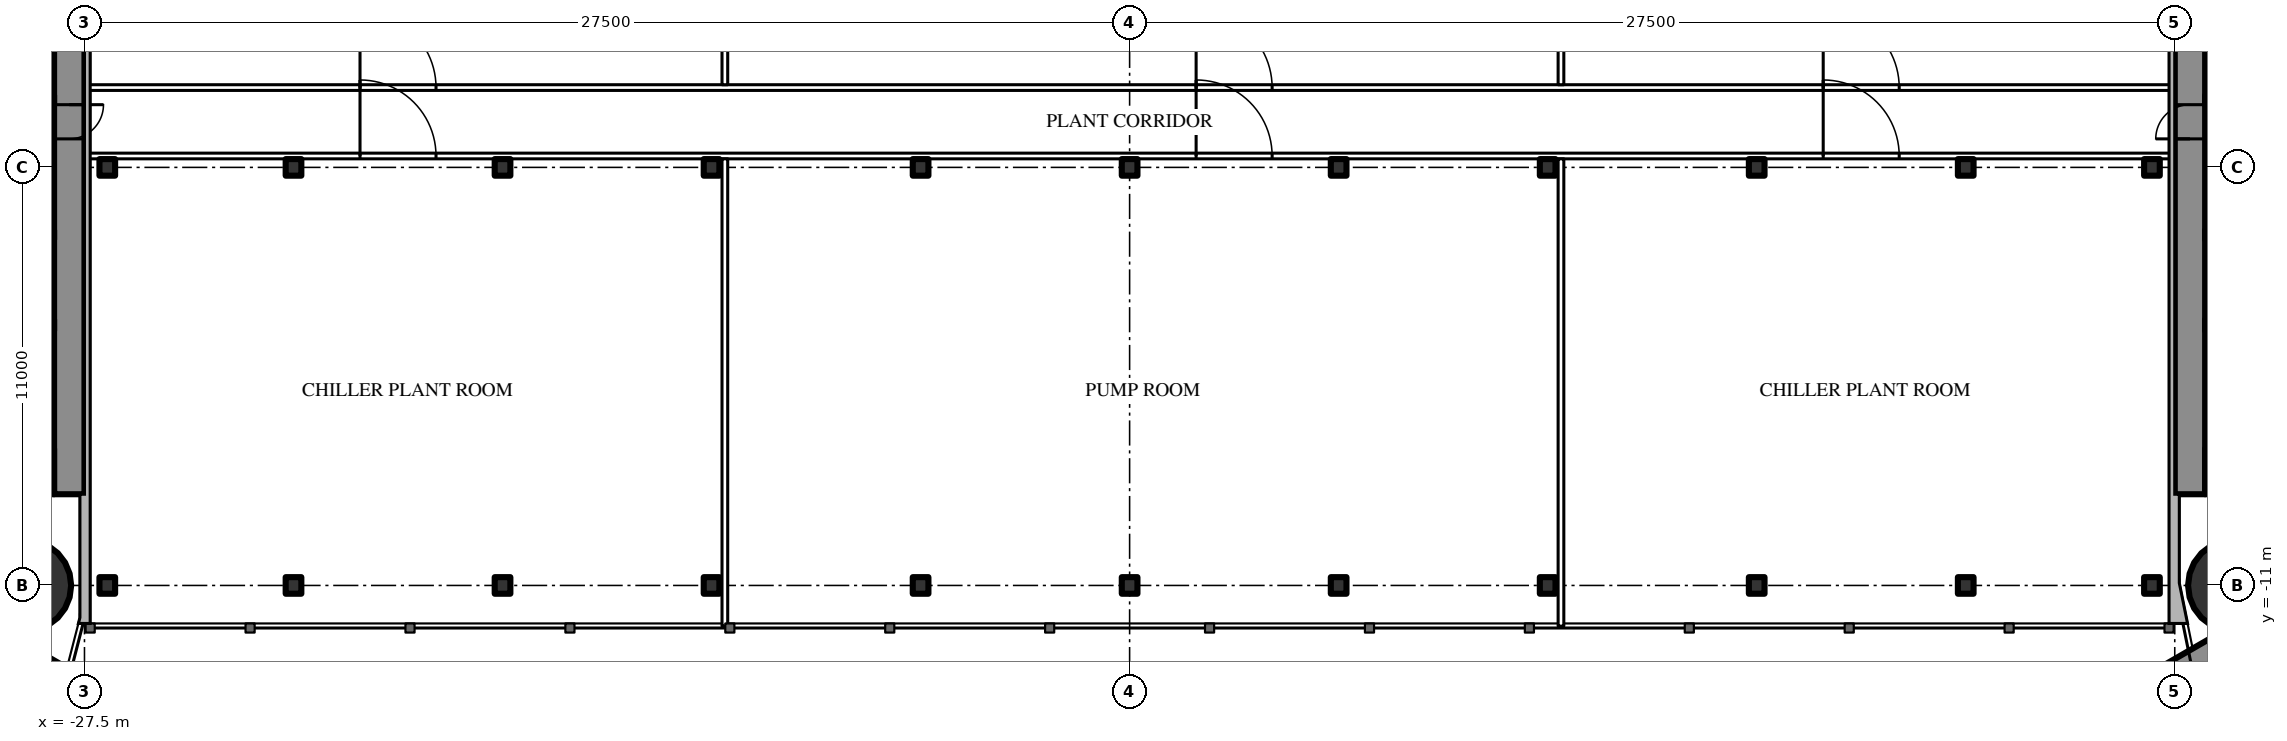
"""IFC4 building model, lengths in metres.
Left out: names, types, materials, properties, quantities, classifications, styles, units other than length and angle.
Written with IfcOpenShell. Run it as: python <this file> out.ifc"""

import sys

from ifc_helpers import new_model, si_unit, direction, frame, frame_2d, origin, origin_2d, place, context, subcontext, project, spatial, rectangle, circle, i_section, extrude, element, fill, save


model = new_model("IFC4")
c1 = context("Model", 3, precision=1e-05, world=origin(), true_north=direction((0.0, 1.0)))
c2 = subcontext(c1, "Body", "Model", "MODEL_VIEW")
j1 = project(units=[si_unit("LENGTHUNIT", "METRE"), si_unit("PLANEANGLEUNIT", "RADIAN")], contexts=[c1])
p1 = place(None, origin())
s1 = spatial("IfcSite", under=j1, at=p1, CompositionType="ELEMENT")
p2 = place(p1, origin())
s2 = spatial("IfcBuilding", under=s1, at=p2, CompositionType="ELEMENT")
p3 = place(p2, frame((0.0, 0.0, 263.3)))
s3 = spatial("IfcBuildingStorey", under=s2, at=p3, CompositionType="ELEMENT", Elevation=263.3)
p4 = place(p3, frame((-29.05, -11.0, 0.0), z_axis=(0.0, 0.0, 1.0), x_axis=(1.0, 0.0, 0.0)))
e1 = element("IfcColumn", 1, at=p4, inside=s3, PredefinedType="COLUMN", context=c2, shape_type="SweptSolid", body=[
    extrude(circle(Radius=1.2, at=origin_2d()), origin(), (0.0, 0.0, 1.0), 5.0),
])
p5 = place(p3, frame((-27.9, 8.6, 0.0), z_axis=(0.0, 0.0, 1.0), x_axis=(0.0, -1.0, 0.0)))
e2 = element("IfcWall", 2, at=p5, inside=s3, PredefinedType="SHEAR", context=c2, shape_type="SweptSolid", body=[
    extrude(rectangle(XDim=17.2, YDim=0.8, at=frame_2d((8.6, 0.0))), origin(), (0.0, 0.0, 1.0), 5.0),
])
p6 = place(p5, frame((6.95, 0.0, 0.0)))
e3 = element("IfcOpeningElement", 3, at=p6, cuts=e2, PredefinedType="OPENING", context=c2, shape_type="SweptSolid", body=[
    extrude(rectangle(XDim=0.9, YDim=2.2, at=frame_2d((0.45, 1.1))), frame((0.0, 0.41, 0.0), z_axis=(0.0, -1.0, 0.0), x_axis=(1.0, 0.0, 0.0)), (0.0, 0.0, 1.0), 0.82),
])
p7 = place(p3, frame((-28.3, -8.0, 0.0), z_axis=(0.0, 0.0, 1.0), x_axis=(-1.0, 0.0, 0.0)))
e4 = element("IfcWall", 4, at=p7, inside=s3, PredefinedType="SHEAR", context=c2, shape_type="SweptSolid", body=[
    extrude(rectangle(XDim=8.4, YDim=1.2, at=frame_2d((4.2, 0.0))), origin(), (0.0, 0.0, 1.0), 5.0),
])
p8 = place(p7, frame((0.25, 0.0, 0.0)))
e5 = element("IfcOpeningElement", 5, at=p8, cuts=e4, PredefinedType="OPENING", context=c2, shape_type="SweptSolid", body=[
    extrude(rectangle(XDim=1.0, YDim=2.2, at=frame_2d((0.5, 1.1))), frame((0.0, 0.61, 0.0), z_axis=(0.0, -1.0, 0.0), x_axis=(1.0, 0.0, 0.0)), (0.0, 0.0, 1.0), 1.22),
])
p9 = place(p3, frame((-28.3, -4.15, 0.0), z_axis=(0.0, 0.0, 1.0), x_axis=(-1.0, 0.0, 0.0)))
e6 = element("IfcWall", 6, at=p9, inside=s3, PredefinedType="SHEAR", context=c2, shape_type="SweptSolid", body=[
    extrude(rectangle(XDim=8.4, YDim=0.3, at=frame_2d((4.2, 0.0))), origin(), (0.0, 0.0, 1.0), 5.0),
])
for number, where, z_axis, x_axis in (
    (7, (-28.3, 1.775, 0.0), (0.0, 0.0, 1.0), (-1.0, 0.0, 0.0)),
    (8, (-28.3, -1.775, 0.0), (0.0, 0.0, 1.0), (-1.0, 0.0, 0.0)),
):
    element("IfcWall", number, at=place(p3, frame(where, z_axis=z_axis, x_axis=x_axis)), inside=s3, PredefinedType="SHEAR", context=c2, shape_type="SweptSolid", body=[
        extrude(rectangle(XDim=2.9, YDim=0.25, at=frame_2d((1.45, 0.0))), origin(), (0.0, 0.0, 1.0), 5.0),
    ])
p10 = place(p3, frame((-27.2, 14.3, 0.0), z_axis=(0.0, 0.0, 1.0), x_axis=(-0.866026593062, -0.499997940104, 0.0)))
e9 = element("IfcWall", 9, at=p10, inside=s3, PredefinedType="SHEAR", context=c2, shape_type="SweptSolid", body=[
    extrude(rectangle(XDim=28.946, YDim=1.2, at=frame_2d((14.473, 0.0))), origin(), (0.0, 0.0, 1.0), 5.0),
])
p11 = place(p10, frame((4.6, 0.0, 0.0)))
e10 = element("IfcOpeningElement", 10, at=p11, cuts=e9, PredefinedType="OPENING", context=c2, shape_type="SweptSolid", body=[
    extrude(rectangle(XDim=1.0, YDim=2.2, at=frame_2d((0.5, 1.1))), frame((0.0, 0.61, 0.0), z_axis=(0.0, -1.0, 0.0), x_axis=(1.0, 0.0, 0.0)), (0.0, 0.0, 1.0), 1.22),
])
p12 = place(p10, frame((13.395, 0.0, 0.0)))
e11 = element("IfcOpeningElement", 11, at=p12, cuts=e9, PredefinedType="OPENING", context=c2, shape_type="SweptSolid", body=[
    extrude(rectangle(XDim=1.8, YDim=2.2, at=frame_2d((0.9, 1.1))), frame((0.0, 0.61, 0.0), z_axis=(0.0, -1.0, 0.0), x_axis=(1.0, 0.0, 0.0)), (0.0, 0.0, 1.0), 1.22),
])
p13 = place(p3, frame((-27.2, -14.3, 0.0), z_axis=(0.0, 0.0, 1.0), x_axis=(-0.866024021859, 0.500002393557, 0.0)))
e12 = element("IfcWall", 12, at=p13, inside=s3, PredefinedType="SHEAR", context=c2, shape_type="SweptSolid", body=[
    extrude(rectangle(XDim=27.907, YDim=1.2, at=frame_2d((13.954, 0.0))), origin(), (0.0, 0.0, 1.0), 5.0),
])
p14 = place(p13, frame((4.6, 0.0, 0.0)))
e13 = element("IfcOpeningElement", 13, at=p14, cuts=e12, PredefinedType="OPENING", context=c2, shape_type="SweptSolid", body=[
    extrude(rectangle(XDim=1.0, YDim=2.2, at=frame_2d((0.5, 1.1))), frame((0.0, 0.61, 0.0), z_axis=(0.0, -1.0, 0.0), x_axis=(1.0, 0.0, 0.0)), (0.0, 0.0, 1.0), 1.22),
])
p15 = place(p13, frame((13.395, 0.0, 0.0)))
e14 = element("IfcOpeningElement", 14, at=p15, cuts=e12, PredefinedType="OPENING", context=c2, shape_type="SweptSolid", body=[
    extrude(rectangle(XDim=1.8, YDim=2.2, at=frame_2d((0.9, 1.1))), frame((0.0, 0.61, 0.0), z_axis=(0.0, -1.0, 0.0), x_axis=(1.0, 0.0, 0.0)), (0.0, 0.0, 1.0), 1.22),
])
p16 = place(p3, frame((29.05, -11.0, 0.0), z_axis=(0.0, 0.0, 1.0), x_axis=(1.0, 0.0, 0.0)))
e15 = element("IfcColumn", 15, at=p16, inside=s3, PredefinedType="COLUMN", context=c2, shape_type="SweptSolid", body=[
    extrude(circle(Radius=1.2, at=origin_2d()), origin(), (0.0, 0.0, 1.0), 5.0),
])
p17 = place(p3, frame((27.9, -8.6, 0.0), z_axis=(0.0, 0.0, 1.0), x_axis=(0.0, 1.0, 0.0)))
e16 = element("IfcWall", 16, at=p17, inside=s3, PredefinedType="SHEAR", context=c2, shape_type="SweptSolid", body=[
    extrude(rectangle(XDim=17.2, YDim=0.8, at=frame_2d((8.6, 0.0))), origin(), (0.0, 0.0, 1.0), 5.0),
])
p18 = place(p17, frame((9.35, 0.0, 0.0)))
e17 = element("IfcOpeningElement", 17, at=p18, cuts=e16, PredefinedType="OPENING", context=c2, shape_type="SweptSolid", body=[
    extrude(rectangle(XDim=0.9, YDim=2.2, at=frame_2d((0.45, 1.1))), frame((0.0, 0.41, 0.0), z_axis=(0.0, -1.0, 0.0), x_axis=(1.0, 0.0, 0.0)), (0.0, 0.0, 1.0), 0.82),
])
p19 = place(p3, frame((28.3, -8.0, 0.0), z_axis=(0.0, 0.0, 1.0), x_axis=(1.0, 0.0, 0.0)))
e18 = element("IfcWall", 18, at=p19, inside=s3, PredefinedType="SHEAR", context=c2, shape_type="SweptSolid", body=[
    extrude(rectangle(XDim=8.4, YDim=1.2, at=frame_2d((4.2, 0.0))), origin(), (0.0, 0.0, 1.0), 5.0),
])
p20 = place(p19, frame((0.25, 0.0, 0.0)))
e19 = element("IfcOpeningElement", 19, at=p20, cuts=e18, PredefinedType="OPENING", context=c2, shape_type="SweptSolid", body=[
    extrude(rectangle(XDim=1.0, YDim=2.2, at=frame_2d((0.5, 1.1))), frame((0.0, 0.61, 0.0), z_axis=(0.0, -1.0, 0.0), x_axis=(1.0, 0.0, 0.0)), (0.0, 0.0, 1.0), 1.22),
])
p21 = place(p3, frame((28.3, -4.15, 0.0), z_axis=(0.0, 0.0, 1.0), x_axis=(1.0, 0.0, 0.0)))
e20 = element("IfcWall", 20, at=p21, inside=s3, PredefinedType="SHEAR", context=c2, shape_type="SweptSolid", body=[
    extrude(rectangle(XDim=8.4, YDim=0.3, at=frame_2d((4.2, 0.0))), origin(), (0.0, 0.0, 1.0), 5.0),
])
for number, where, z_axis, x_axis in (
    (21, (28.3, -1.775, 0.0), (0.0, 0.0, 1.0), (1.0, 0.0, 0.0)),
    (22, (28.3, 1.775, 0.0), (0.0, 0.0, 1.0), (1.0, 0.0, 0.0)),
):
    element("IfcWall", number, at=place(p3, frame(where, z_axis=z_axis, x_axis=x_axis)), inside=s3, PredefinedType="SHEAR", context=c2, shape_type="SweptSolid", body=[
        extrude(rectangle(XDim=2.9, YDim=0.25, at=frame_2d((1.45, 0.0))), origin(), (0.0, 0.0, 1.0), 5.0),
    ])
p22 = place(p3, frame((27.2, -13.8, 0.0), z_axis=(0.0, 0.0, 1.0), x_axis=(0.866027159892, 0.499996958321, 0.0)))
e23 = element("IfcWall", 23, at=p22, inside=s3, PredefinedType="SHEAR", context=c2, shape_type="SweptSolid", body=[
    extrude(rectangle(XDim=27.947, YDim=1.2, at=frame_2d((13.973, 0.0))), origin(), (0.0, 0.0, 1.0), 5.0),
])
p23 = place(p22, frame((4.6, 0.0, 0.0)))
e24 = element("IfcOpeningElement", 24, at=p23, cuts=e23, PredefinedType="OPENING", context=c2, shape_type="SweptSolid", body=[
    extrude(rectangle(XDim=1.0, YDim=2.2, at=frame_2d((0.5, 1.1))), frame((0.0, 0.61, 0.0), z_axis=(0.0, -1.0, 0.0), x_axis=(1.0, 0.0, 0.0)), (0.0, 0.0, 1.0), 1.22),
])
p24 = place(p22, frame((13.395, 0.0, 0.0)))
e25 = element("IfcOpeningElement", 25, at=p24, cuts=e23, PredefinedType="OPENING", context=c2, shape_type="SweptSolid", body=[
    extrude(rectangle(XDim=1.8, YDim=2.2, at=frame_2d((0.9, 1.1))), frame((0.0, 0.61, 0.0), z_axis=(0.0, -1.0, 0.0), x_axis=(1.0, 0.0, 0.0)), (0.0, 0.0, 1.0), 1.22),
])
p25 = place(p3, frame((27.2, 13.8, 0.0), z_axis=(0.0, 0.0, 1.0), x_axis=(0.866024515034, -0.500001539357, 0.0)))
e26 = element("IfcWall", 26, at=p25, inside=s3, PredefinedType="SHEAR", context=c2, shape_type="SweptSolid", body=[
    extrude(rectangle(XDim=26.907, YDim=1.2, at=frame_2d((13.454, 0.0))), origin(), (0.0, 0.0, 1.0), 5.0),
])
p26 = place(p25, frame((4.6, 0.0, 0.0)))
e27 = element("IfcOpeningElement", 27, at=p26, cuts=e26, PredefinedType="OPENING", context=c2, shape_type="SweptSolid", body=[
    extrude(rectangle(XDim=1.0, YDim=2.2, at=frame_2d((0.5, 1.1))), frame((0.0, 0.61, 0.0), z_axis=(0.0, -1.0, 0.0), x_axis=(1.0, 0.0, 0.0)), (0.0, 0.0, 1.0), 1.22),
])
p27 = place(p25, frame((13.395, 0.0, 0.0)))
e28 = element("IfcOpeningElement", 28, at=p27, cuts=e26, PredefinedType="OPENING", context=c2, shape_type="SweptSolid", body=[
    extrude(rectangle(XDim=1.8, YDim=2.2, at=frame_2d((0.9, 1.1))), frame((0.0, 0.61, 0.0), z_axis=(0.0, -1.0, 0.0), x_axis=(1.0, 0.0, 0.0)), (0.0, 0.0, 1.0), 1.22),
])
for number, where, z_axis, x_axis in (
    (29, (-26.9, -11.0, 0.0), (0.0, 0.0, 1.0), (1.0, 0.0, 0.0)),
    (30, (-22.0, -11.0, 0.0), (0.0, 0.0, 1.0), (1.0, 0.0, 0.0)),
    (31, (-16.5, -11.0, 0.0), (0.0, 0.0, 1.0), (1.0, 0.0, 0.0)),
    (32, (-11.0, -11.0, 0.0), (0.0, 0.0, 1.0), (1.0, 0.0, 0.0)),
    (33, (-5.5, -11.0, 0.0), (0.0, 0.0, 1.0), (1.0, 0.0, 0.0)),
    (34, (0.0, -11.0, 0.0), (0.0, 0.0, 1.0), (1.0, 0.0, 0.0)),
    (35, (5.5, -11.0, 0.0), (0.0, 0.0, 1.0), (1.0, 0.0, 0.0)),
    (36, (11.0, -11.0, 0.0), (0.0, 0.0, 1.0), (1.0, 0.0, 0.0)),
    (37, (16.5, -11.0, 0.0), (0.0, 0.0, 1.0), (1.0, 0.0, 0.0)),
    (38, (22.0, -11.0, 0.0), (0.0, 0.0, 1.0), (1.0, 0.0, 0.0)),
    (39, (26.9, -11.0, 0.0), (0.0, 0.0, 1.0), (1.0, 0.0, 0.0)),
    (40, (-26.9, 0.0, 0.0), (0.0, 0.0, 1.0), (1.0, 0.0, 0.0)),
    (41, (-22.0, 0.0, 0.0), (0.0, 0.0, 1.0), (1.0, 0.0, 0.0)),
    (42, (-16.5, 0.0, 0.0), (0.0, 0.0, 1.0), (1.0, 0.0, 0.0)),
    (43, (-11.0, 0.0, 0.0), (0.0, 0.0, 1.0), (1.0, 0.0, 0.0)),
    (44, (-5.5, 0.0, 0.0), (0.0, 0.0, 1.0), (1.0, 0.0, 0.0)),
    (45, (0.0, 0.0, 0.0), (0.0, 0.0, 1.0), (1.0, 0.0, 0.0)),
    (46, (5.5, 0.0, 0.0), (0.0, 0.0, 1.0), (1.0, 0.0, 0.0)),
    (47, (11.0, 0.0, 0.0), (0.0, 0.0, 1.0), (1.0, 0.0, 0.0)),
    (48, (16.5, 0.0, 0.0), (0.0, 0.0, 1.0), (1.0, 0.0, 0.0)),
    (49, (22.0, 0.0, 0.0), (0.0, 0.0, 1.0), (1.0, 0.0, 0.0)),
    (50, (26.9, 0.0, 0.0), (0.0, 0.0, 1.0), (1.0, 0.0, 0.0)),
):
    element("IfcColumn", number, at=place(p3, frame(where, z_axis=z_axis, x_axis=x_axis)), inside=s3, PredefinedType="COLUMN", context=c2, shape_type="SweptSolid", body=[
        extrude(i_section(OverallWidth=0.412, OverallDepth=0.437, WebThickness=0.036, FlangeThickness=0.058, FilletRadius=0.015, at=origin_2d()), origin(), (0.0, 0.0, 1.0), 5.0),
    ])
p28 = place(p3, frame((-27.5, 0.3, 0.0), z_axis=(0.0, 0.0, 1.0), x_axis=(1.0, 0.0, 0.0)))
e51 = element("IfcWall", 51, at=p28, inside=s3, PredefinedType="PARTITIONING", context=c2, shape_type="SweptSolid", body=[
    extrude(rectangle(XDim=55.0, YDim=0.15, at=frame_2d((27.5, 0.0))), origin(), (0.0, 0.0, 1.0), 3.8),
])
p29 = place(p28, frame((7.25, 0.0, 0.0)))
e52 = element("IfcOpeningElement", 52, at=p29, cuts=e51, PredefinedType="OPENING", context=c2, shape_type="SweptSolid", body=[
    extrude(rectangle(XDim=2.0, YDim=2.4, at=frame_2d((1.0, 1.2))), frame((0.0, 0.085, 0.0), z_axis=(0.0, -1.0, 0.0), x_axis=(1.0, 0.0, 0.0)), (0.0, 0.0, 1.0), 0.17),
])
p30 = place(p28, frame((29.25, 0.0, 0.0)))
e53 = element("IfcOpeningElement", 53, at=p30, cuts=e51, PredefinedType="OPENING", context=c2, shape_type="SweptSolid", body=[
    extrude(rectangle(XDim=2.0, YDim=2.4, at=frame_2d((1.0, 1.2))), frame((0.0, 0.085, 0.0), z_axis=(0.0, -1.0, 0.0), x_axis=(1.0, 0.0, 0.0)), (0.0, 0.0, 1.0), 0.17),
])
p31 = place(p28, frame((45.75, 0.0, 0.0)))
e54 = element("IfcOpeningElement", 54, at=p31, cuts=e51, PredefinedType="OPENING", context=c2, shape_type="SweptSolid", body=[
    extrude(rectangle(XDim=2.0, YDim=2.4, at=frame_2d((1.0, 1.2))), frame((0.0, 0.085, 0.0), z_axis=(0.0, -1.0, 0.0), x_axis=(1.0, 0.0, 0.0)), (0.0, 0.0, 1.0), 0.17),
])
p32 = place(p3, frame((-27.5, 2.1, 0.0), z_axis=(0.0, 0.0, 1.0), x_axis=(1.0, 0.0, 0.0)))
e55 = element("IfcWall", 55, at=p32, inside=s3, PredefinedType="PARTITIONING", context=c2, shape_type="SweptSolid", body=[
    extrude(rectangle(XDim=55.0, YDim=0.15, at=frame_2d((27.5, 0.0))), origin(), (0.0, 0.0, 1.0), 4.8),
])
p33 = place(p32, frame((7.25, 0.0, 0.0)))
e56 = element("IfcOpeningElement", 56, at=p33, cuts=e55, PredefinedType="OPENING", context=c2, shape_type="SweptSolid", body=[
    extrude(rectangle(XDim=2.0, YDim=2.4, at=frame_2d((1.0, 1.2))), frame((0.0, 0.085, 0.0), z_axis=(0.0, -1.0, 0.0), x_axis=(1.0, 0.0, 0.0)), (0.0, 0.0, 1.0), 0.17),
])
p34 = place(p32, frame((29.25, 0.0, 0.0)))
e57 = element("IfcOpeningElement", 57, at=p34, cuts=e55, PredefinedType="OPENING", context=c2, shape_type="SweptSolid", body=[
    extrude(rectangle(XDim=2.0, YDim=2.4, at=frame_2d((1.0, 1.2))), frame((0.0, 0.085, 0.0), z_axis=(0.0, -1.0, 0.0), x_axis=(1.0, 0.0, 0.0)), (0.0, 0.0, 1.0), 0.17),
])
p35 = place(p32, frame((45.75, 0.0, 0.0)))
e58 = element("IfcOpeningElement", 58, at=p35, cuts=e55, PredefinedType="OPENING", context=c2, shape_type="SweptSolid", body=[
    extrude(rectangle(XDim=2.0, YDim=2.4, at=frame_2d((1.0, 1.2))), frame((0.0, 0.085, 0.0), z_axis=(0.0, -1.0, 0.0), x_axis=(1.0, 0.0, 0.0)), (0.0, 0.0, 1.0), 0.17),
])
for number, where, z_axis, x_axis in (
    (59, (-10.65, -12.07, 0.0), (0.0, 0.0, 1.0), (0.0, 1.0, 0.0)),
    (60, (11.35, -12.07, 0.0), (0.0, 0.0, 1.0), (0.0, 1.0, 0.0)),
):
    element("IfcWall", number, at=place(p3, frame(where, z_axis=z_axis, x_axis=x_axis)), inside=s3, PredefinedType="PARTITIONING", context=c2, shape_type="SweptSolid", body=[
        extrude(rectangle(XDim=12.295, YDim=0.15, at=frame_2d((6.147, 0.0))), origin(), (0.0, 0.0, 1.0), 4.8),
    ])
for number, where, z_axis, x_axis in (
    (61, (-10.65, 2.175, 0.0), (0.0, 0.0, 1.0), (0.0, 1.0, 0.0)),
    (62, (11.35, 2.175, 0.0), (0.0, 0.0, 1.0), (0.0, 1.0, 0.0)),
):
    element("IfcWall", number, at=place(p3, frame(where, z_axis=z_axis, x_axis=x_axis)), inside=s3, PredefinedType="PARTITIONING", context=c2, shape_type="SweptSolid", body=[
        extrude(rectangle(XDim=9.895, YDim=0.15, at=frame_2d((4.948, 0.0))), origin(), (0.0, 0.0, 1.0), 4.8),
    ])
p36 = place(p6, origin())
e63 = element("IfcDoor", 63, at=p36, inside=s3, OperationType="SINGLE_SWING_LEFT", PredefinedType="DOOR", context=c2, shape_type="SweptSolid", body=[
    extrude(rectangle(XDim=0.9, YDim=2.2, at=frame_2d((0.45, 1.1))), frame((0.0, 0.025, 0.0), z_axis=(0.0, -1.0, 0.0), x_axis=(1.0, 0.0, 0.0)), (0.0, 0.0, 1.0), 0.05),
])
fill(e3, e63)
p37 = place(p18, origin())
e64 = element("IfcDoor", 64, at=p37, inside=s3, OperationType="SINGLE_SWING_LEFT", PredefinedType="DOOR", context=c2, shape_type="SweptSolid", body=[
    extrude(rectangle(XDim=0.9, YDim=2.2, at=frame_2d((0.45, 1.1))), frame((0.0, 0.025, 0.0), z_axis=(0.0, -1.0, 0.0), x_axis=(1.0, 0.0, 0.0)), (0.0, 0.0, 1.0), 0.05),
])
fill(e17, e64)
p38 = place(p29, origin())
e65 = element("IfcDoor", 65, at=p38, inside=s3, OperationType="DOUBLE_DOOR_SINGLE_SWING", PredefinedType="DOOR", context=c2, shape_type="SweptSolid", body=[
    extrude(rectangle(XDim=2.0, YDim=2.4, at=frame_2d((1.0, 1.2))), frame((0.0, 0.025, 0.0), z_axis=(0.0, -1.0, 0.0), x_axis=(1.0, 0.0, 0.0)), (0.0, 0.0, 1.0), 0.05),
])
fill(e52, e65)
p39 = place(p30, origin())
e66 = element("IfcDoor", 66, at=p39, inside=s3, OperationType="DOUBLE_DOOR_SINGLE_SWING", PredefinedType="DOOR", context=c2, shape_type="SweptSolid", body=[
    extrude(rectangle(XDim=2.0, YDim=2.4, at=frame_2d((1.0, 1.2))), frame((0.0, 0.025, 0.0), z_axis=(0.0, -1.0, 0.0), x_axis=(1.0, 0.0, 0.0)), (0.0, 0.0, 1.0), 0.05),
])
fill(e53, e66)
p40 = place(p31, origin())
e67 = element("IfcDoor", 67, at=p40, inside=s3, OperationType="DOUBLE_DOOR_SINGLE_SWING", PredefinedType="DOOR", context=c2, shape_type="SweptSolid", body=[
    extrude(rectangle(XDim=2.0, YDim=2.4, at=frame_2d((1.0, 1.2))), frame((0.0, 0.025, 0.0), z_axis=(0.0, -1.0, 0.0), x_axis=(1.0, 0.0, 0.0)), (0.0, 0.0, 1.0), 0.05),
])
fill(e54, e67)
p41 = place(p33, origin())
e68 = element("IfcDoor", 68, at=p41, inside=s3, OperationType="DOUBLE_DOOR_SINGLE_SWING", PredefinedType="DOOR", context=c2, shape_type="SweptSolid", body=[
    extrude(rectangle(XDim=2.0, YDim=2.4, at=frame_2d((1.0, 1.2))), frame((0.0, 0.025, 0.0), z_axis=(0.0, -1.0, 0.0), x_axis=(1.0, 0.0, 0.0)), (0.0, 0.0, 1.0), 0.05),
])
fill(e56, e68)
p42 = place(p34, origin())
e69 = element("IfcDoor", 69, at=p42, inside=s3, OperationType="DOUBLE_DOOR_SINGLE_SWING", PredefinedType="DOOR", context=c2, shape_type="SweptSolid", body=[
    extrude(rectangle(XDim=2.0, YDim=2.4, at=frame_2d((1.0, 1.2))), frame((0.0, 0.025, 0.0), z_axis=(0.0, -1.0, 0.0), x_axis=(1.0, 0.0, 0.0)), (0.0, 0.0, 1.0), 0.05),
])
fill(e57, e69)
p43 = place(p35, origin())
e70 = element("IfcDoor", 70, at=p43, inside=s3, OperationType="DOUBLE_DOOR_SINGLE_SWING", PredefinedType="DOOR", context=c2, shape_type="SweptSolid", body=[
    extrude(rectangle(XDim=2.0, YDim=2.4, at=frame_2d((1.0, 1.2))), frame((0.0, 0.025, 0.0), z_axis=(0.0, -1.0, 0.0), x_axis=(1.0, 0.0, 0.0)), (0.0, 0.0, 1.0), 0.05),
])
fill(e58, e70)
save(model, sys.argv[1])
